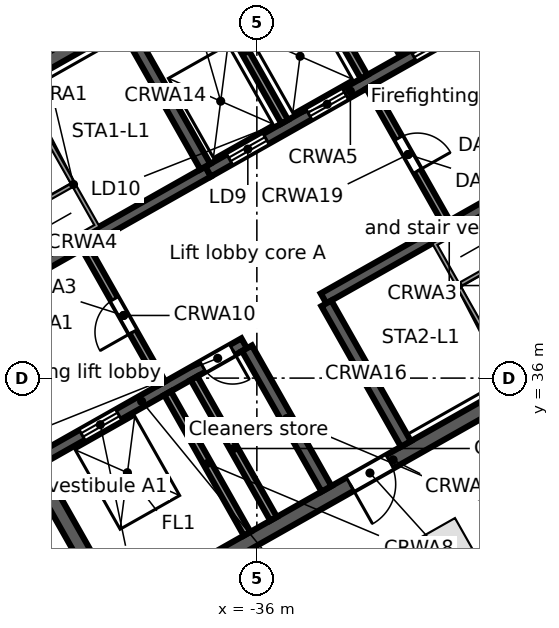
"""IFC4 building model, lengths in metres.
Left out: names, types, materials, properties, quantities, classifications, styles, units other than length and angle.
Written with IfcOpenShell. Run it as: python <this file> out.ifc"""

import sys

from ifc_helpers import new_model, si_unit, direction, frame, frame_2d, origin, origin_2d, place, context, subcontext, project, spatial, rectangle, extrude, element, fill, save


model = new_model("IFC4")
c1 = context("Model", 3, precision=1e-05, world=origin(), true_north=direction((0.0, 1.0)))
c2 = subcontext(c1, "Body", "Model", "MODEL_VIEW")
j1 = project(units=[si_unit("LENGTHUNIT", "METRE"), si_unit("PLANEANGLEUNIT", "RADIAN")], contexts=[c1])
p1 = place(None, origin())
s1 = spatial("IfcSite", under=j1, at=p1, CompositionType="ELEMENT")
p2 = place(p1, origin())
s2 = spatial("IfcBuilding", under=s1, at=p2, CompositionType="ELEMENT")
p3 = place(p2, frame((0.0, 0.0, 339.3)))
s3 = spatial("IfcBuildingStorey", under=s2, at=p3, CompositionType="ELEMENT", Elevation=339.3)
p4 = place(p3, frame((-30.976, 31.635, 0.0), z_axis=(0.0, 0.0, 1.0), x_axis=(0.87035569594, 0.492423560103, 0.0)))
e1 = element("IfcColumn", 1, at=p4, inside=s3, PredefinedType="COLUMN", context=c2, shape_type="SweptSolid", body=[
    extrude(rectangle(XDim=1.0, YDim=1.0, at=origin_2d()), origin(), (0.0, 0.0, 1.0), 3.8),
])
p5 = place(p3, frame((-3.017, 46.293, 0.0), z_axis=(0.0, 0.0, 1.0), x_axis=(-0.870355474887, -0.492423950812, 0.0)))
e2 = element("IfcWall", 2, at=p5, inside=s3, PredefinedType="STANDARD", context=c2, shape_type="SweptSolid", body=[
    extrude(rectangle(XDim=40.34, YDim=0.25, at=frame_2d((20.17, 0.0))), origin(), (0.0, 0.0, 1.0), 3.52),
])
p6 = place(p5, frame((37.428, 0.0, 0.8)))
e3 = element("IfcOpeningElement", 3, at=p6, cuts=e2, PredefinedType="OPENING", context=c2, shape_type="SweptSolid", body=[
    extrude(rectangle(XDim=2.4, YDim=2.2, at=frame_2d((1.2, 1.1))), frame((0.0, 0.135, 0.0), z_axis=(0.0, -1.0, 0.0), x_axis=(1.0, 0.0, 0.0)), (0.0, 0.0, 1.0), 0.27),
])
p7 = place(p5, frame((34.372, 0.0, 0.0)))
e4 = element("IfcOpeningElement", 4, at=p7, cuts=e2, PredefinedType="OPENING", context=c2, shape_type="SweptSolid", body=[
    extrude(rectangle(XDim=1.8, YDim=2.4, at=frame_2d((0.9, 1.2))), frame((0.0, 0.135, 0.0), z_axis=(0.0, -1.0, 0.0), x_axis=(1.0, 0.0, 0.0)), (0.0, 0.0, 1.0), 0.27),
])
p8 = place(p5, frame((30.716, 0.0, 0.8)))
e5 = element("IfcOpeningElement", 5, at=p8, cuts=e2, PredefinedType="OPENING", context=c2, shape_type="SweptSolid", body=[
    extrude(rectangle(XDim=2.4, YDim=2.2, at=frame_2d((1.2, 1.1))), frame((0.0, 0.135, 0.0), z_axis=(0.0, -1.0, 0.0), x_axis=(1.0, 0.0, 0.0)), (0.0, 0.0, 1.0), 0.27),
])
p9 = place(p5, frame((27.36, 0.0, 0.8)))
e6 = element("IfcOpeningElement", 6, at=p9, cuts=e2, PredefinedType="OPENING", context=c2, shape_type="SweptSolid", body=[
    extrude(rectangle(XDim=2.4, YDim=2.2, at=frame_2d((1.2, 1.1))), frame((0.0, 0.135, 0.0), z_axis=(0.0, -1.0, 0.0), x_axis=(1.0, 0.0, 0.0)), (0.0, 0.0, 1.0), 0.27),
])
p10 = place(p5, frame((24.304, 0.0, 0.0)))
e7 = element("IfcOpeningElement", 7, at=p10, cuts=e2, PredefinedType="OPENING", context=c2, shape_type="SweptSolid", body=[
    extrude(rectangle(XDim=1.8, YDim=2.4, at=frame_2d((0.9, 1.2))), frame((0.0, 0.135, 0.0), z_axis=(0.0, -1.0, 0.0), x_axis=(1.0, 0.0, 0.0)), (0.0, 0.0, 1.0), 0.27),
])
p11 = place(p5, frame((20.648, 0.0, 0.8)))
e8 = element("IfcOpeningElement", 8, at=p11, cuts=e2, PredefinedType="OPENING", context=c2, shape_type="SweptSolid", body=[
    extrude(rectangle(XDim=2.4, YDim=2.2, at=frame_2d((1.2, 1.1))), frame((0.0, 0.135, 0.0), z_axis=(0.0, -1.0, 0.0), x_axis=(1.0, 0.0, 0.0)), (0.0, 0.0, 1.0), 0.27),
])
p12 = place(p5, frame((17.292, 0.0, 0.8)))
e9 = element("IfcOpeningElement", 9, at=p12, cuts=e2, PredefinedType="OPENING", context=c2, shape_type="SweptSolid", body=[
    extrude(rectangle(XDim=2.4, YDim=2.2, at=frame_2d((1.2, 1.1))), frame((0.0, 0.135, 0.0), z_axis=(0.0, -1.0, 0.0), x_axis=(1.0, 0.0, 0.0)), (0.0, 0.0, 1.0), 0.27),
])
p13 = place(p5, frame((14.236, 0.0, 0.0)))
e10 = element("IfcOpeningElement", 10, at=p13, cuts=e2, PredefinedType="OPENING", context=c2, shape_type="SweptSolid", body=[
    extrude(rectangle(XDim=1.8, YDim=2.4, at=frame_2d((0.9, 1.2))), frame((0.0, 0.135, 0.0), z_axis=(0.0, -1.0, 0.0), x_axis=(1.0, 0.0, 0.0)), (0.0, 0.0, 1.0), 0.27),
])
p14 = place(p5, frame((10.58, 0.0, 0.8)))
e11 = element("IfcOpeningElement", 11, at=p14, cuts=e2, PredefinedType="OPENING", context=c2, shape_type="SweptSolid", body=[
    extrude(rectangle(XDim=2.4, YDim=2.2, at=frame_2d((1.2, 1.1))), frame((0.0, 0.135, 0.0), z_axis=(0.0, -1.0, 0.0), x_axis=(1.0, 0.0, 0.0)), (0.0, 0.0, 1.0), 0.27),
])
p15 = place(p5, frame((7.224, 0.0, 0.8)))
e12 = element("IfcOpeningElement", 12, at=p15, cuts=e2, PredefinedType="OPENING", context=c2, shape_type="SweptSolid", body=[
    extrude(rectangle(XDim=2.4, YDim=2.2, at=frame_2d((1.2, 1.1))), frame((0.0, 0.135, 0.0), z_axis=(0.0, -1.0, 0.0), x_axis=(1.0, 0.0, 0.0)), (0.0, 0.0, 1.0), 0.27),
])
p16 = place(p5, frame((4.168, 0.0, 0.0)))
e13 = element("IfcOpeningElement", 13, at=p16, cuts=e2, PredefinedType="OPENING", context=c2, shape_type="SweptSolid", body=[
    extrude(rectangle(XDim=1.8, YDim=2.4, at=frame_2d((0.9, 1.2))), frame((0.0, 0.135, 0.0), z_axis=(0.0, -1.0, 0.0), x_axis=(1.0, 0.0, 0.0)), (0.0, 0.0, 1.0), 0.27),
])
p17 = place(p5, frame((0.512, 0.0, 0.8)))
e14 = element("IfcOpeningElement", 14, at=p17, cuts=e2, PredefinedType="OPENING", context=c2, shape_type="SweptSolid", body=[
    extrude(rectangle(XDim=2.4, YDim=2.2, at=frame_2d((1.2, 1.1))), frame((0.0, 0.135, 0.0), z_axis=(0.0, -1.0, 0.0), x_axis=(1.0, 0.0, 0.0)), (0.0, 0.0, 1.0), 0.27),
])
p18 = place(p3, frame((-39.813, 29.662, 0.0), z_axis=(0.0, 0.0, 1.0), x_axis=(0.870350116061, 0.492433422375, 0.0)))
e15 = element("IfcWall", 15, at=p18, inside=s3, PredefinedType="SOLIDWALL", context=c2, shape_type="SweptSolid", body=[
    extrude(rectangle(XDim=17.0, YDim=0.4, at=frame_2d((8.5, 0.0))), origin(), (0.0, 0.0, 1.0), 3.52),
])
p19 = place(p18, frame((7.2, 0.0, 0.0)))
e16 = element("IfcOpeningElement", 16, at=p19, cuts=e15, PredefinedType="OPENING", context=c2, shape_type="SweptSolid", body=[
    extrude(rectangle(XDim=1.2, YDim=2.1, at=frame_2d((0.6, 1.05))), frame((0.0, 0.21, 0.0), z_axis=(0.0, -1.0, 0.0), x_axis=(1.0, 0.0, 0.0)), (0.0, 0.0, 1.0), 0.42),
])
p20 = place(p3, frame((-41.73, 33.863, 0.0), z_axis=(0.0, 0.0, 1.0), x_axis=(0.870350800578, 0.492432212525, 0.0)))
e17 = element("IfcWall", 17, at=p20, inside=s3, PredefinedType="SOLIDWALL", context=c2, shape_type="SweptSolid", body=[
    extrude(rectangle(XDim=6.2, YDim=0.3, at=frame_2d((3.1, 0.0))), origin(), (0.0, 0.0, 1.0), 3.52),
])
p21 = place(p20, frame((1.3, 0.0, 0.0)))
e18 = element("IfcOpeningElement", 18, at=p21, cuts=e17, PredefinedType="OPENING", context=c2, shape_type="SweptSolid", body=[
    extrude(rectangle(XDim=1.1, YDim=2.1, at=frame_2d((0.55, 1.05))), frame((0.0, 0.16, 0.0), z_axis=(0.0, -1.0, 0.0), x_axis=(1.0, 0.0, 0.0)), (0.0, 0.0, 1.0), 0.32),
])
p22 = place(p20, frame((4.95, 0.0, 0.0)))
e19 = element("IfcOpeningElement", 19, at=p22, cuts=e17, PredefinedType="OPENING", context=c2, shape_type="SweptSolid", body=[
    extrude(rectangle(XDim=0.9, YDim=2.1, at=frame_2d((0.45, 1.05))), frame((0.0, 0.16, 0.0), z_axis=(0.0, -1.0, 0.0), x_axis=(1.0, 0.0, 0.0)), (0.0, 0.0, 1.0), 0.32),
])
p23 = place(p3, frame((-34.245, 38.097, 0.0), z_axis=(0.0, 0.0, 1.0), x_axis=(0.870356351998, 0.492422400523, 0.0)))
e20 = element("IfcWall", 20, at=p23, inside=s3, PredefinedType="SOLIDWALL", context=c2, shape_type="SweptSolid", body=[
    extrude(rectangle(XDim=7.6, YDim=0.3, at=frame_2d((3.8, 0.0))), origin(), (0.0, 0.0, 1.0), 3.52),
])
p24 = place(p23, frame((6.2, 0.0, 0.0)))
e21 = element("IfcOpeningElement", 21, at=p24, cuts=e20, PredefinedType="OPENING", context=c2, shape_type="SweptSolid", body=[
    extrude(rectangle(XDim=1.0, YDim=2.1, at=frame_2d((0.5, 1.05))), frame((0.0, 0.16, 0.0), z_axis=(0.0, -1.0, 0.0), x_axis=(1.0, 0.0, 0.0)), (0.0, 0.0, 1.0), 0.32),
])
p25 = place(p3, frame((-43.897, 37.692, 0.0), z_axis=(0.0, 0.0, 1.0), x_axis=(0.870356351998, 0.492422400523, 0.0)))
e22 = element("IfcWall", 22, at=p25, inside=s3, PredefinedType="SOLIDWALL", context=c2, shape_type="SweptSolid", body=[
    extrude(rectangle(XDim=7.6, YDim=0.3, at=frame_2d((3.8, 0.0))), origin(), (0.0, 0.0, 1.0), 3.52),
])
p26 = place(p25, frame((0.4, 0.0, 0.0)))
e23 = element("IfcOpeningElement", 23, at=p26, cuts=e22, PredefinedType="OPENING", context=c2, shape_type="SweptSolid", body=[
    extrude(rectangle(XDim=1.0, YDim=2.1, at=frame_2d((0.5, 1.05))), frame((0.0, 0.16, 0.0), z_axis=(0.0, -1.0, 0.0), x_axis=(1.0, 0.0, 0.0)), (0.0, 0.0, 1.0), 0.32),
])
p27 = place(p3, frame((-37.282, 41.435, 0.0), z_axis=(0.0, 0.0, 1.0), x_axis=(0.870361315115, 0.492413628113, 0.0)))
e24 = element("IfcWall", 24, at=p27, inside=s3, PredefinedType="SOLIDWALL", context=c2, shape_type="SweptSolid", body=[
    extrude(rectangle(XDim=8.6, YDim=0.3, at=frame_2d((4.3, 0.0))), origin(), (0.0, 0.0, 1.0), 3.52),
])
p28 = place(p27, frame((0.65, 0.0, 0.0)))
e25 = element("IfcOpeningElement", 25, at=p28, cuts=e24, PredefinedType="OPENING", context=c2, shape_type="SweptSolid", body=[
    extrude(rectangle(XDim=1.1, YDim=2.1, at=frame_2d((0.55, 1.05))), frame((0.0, 0.16, 0.0), z_axis=(0.0, -1.0, 0.0), x_axis=(1.0, 0.0, 0.0)), (0.0, 0.0, 1.0), 0.32),
])
p29 = place(p27, frame((3.05, 0.0, 0.0)))
e26 = element("IfcOpeningElement", 26, at=p29, cuts=e24, PredefinedType="OPENING", context=c2, shape_type="SweptSolid", body=[
    extrude(rectangle(XDim=1.1, YDim=2.1, at=frame_2d((0.55, 1.05))), frame((0.0, 0.16, 0.0), z_axis=(0.0, -1.0, 0.0), x_axis=(1.0, 0.0, 0.0)), (0.0, 0.0, 1.0), 0.32),
])
p30 = place(p27, frame((6.2, 0.0, 0.0)))
e27 = element("IfcOpeningElement", 27, at=p30, cuts=e24, PredefinedType="OPENING", context=c2, shape_type="SweptSolid", body=[
    extrude(rectangle(XDim=1.1, YDim=2.1, at=frame_2d((0.55, 1.05))), frame((0.0, 0.16, 0.0), z_axis=(0.0, -1.0, 0.0), x_axis=(1.0, 0.0, 0.0)), (0.0, 0.0, 1.0), 0.32),
])
p31 = place(p3, frame((-46.51, 41.499, 0.0), z_axis=(0.0, 0.0, 1.0), x_axis=(0.870356271124, 0.492422543467, 0.0)))
e28 = element("IfcWall", 28, at=p31, inside=s3, PredefinedType="SOLIDWALL", context=c2, shape_type="SweptSolid", body=[
    extrude(rectangle(XDim=17.0, YDim=0.4, at=frame_2d((8.5, 0.0))), origin(), (0.0, 0.0, 1.0), 3.52),
])
p32 = place(p3, frame((-46.238, 41.423, 0.0), z_axis=(0.0, 0.0, 1.0), x_axis=(0.492421663121, -0.870356769198, 0.0)))
e29 = element("IfcWall", 29, at=p32, inside=s3, PredefinedType="SOLIDWALL", context=c2, shape_type="SweptSolid", body=[
    extrude(rectangle(XDim=13.2, YDim=0.4, at=frame_2d((6.6, 0.0))), origin(), (0.0, 0.0, 1.0), 3.52),
])
p33 = place(p3, frame((-38.349, 35.603, 0.0), z_axis=(0.0, 0.0, 1.0), x_axis=(0.492397924348, -0.870370199454, 0.0)))
e30 = element("IfcWall", 30, at=p33, inside=s3, PredefinedType="SOLIDWALL", context=c2, shape_type="SweptSolid", body=[
    extrude(rectangle(XDim=4.25, YDim=0.2, at=frame_2d((2.125, 0.0))), origin(), (0.0, 0.0, 1.0), 3.52),
])
p34 = place(p3, frame((-40.516, 39.433, 0.0), z_axis=(0.0, 0.0, 1.0), x_axis=(0.492453559952, -0.87033872216, 0.0)))
e31 = element("IfcWall", 31, at=p34, inside=s3, PredefinedType="PARTITIONING", context=c2, shape_type="SweptSolid", body=[
    extrude(rectangle(XDim=4.1, YDim=0.2, at=frame_2d((2.05, 0.0))), origin(), (0.0, 0.0, 1.0), 3.52),
])
p35 = place(p34, frame((1.55, 0.0, 0.0)))
e32 = element("IfcOpeningElement", 32, at=p35, cuts=e31, PredefinedType="OPENING", context=c2, shape_type="SweptSolid", body=[
    extrude(rectangle(XDim=1.0, YDim=2.1, at=frame_2d((0.5, 1.05))), frame((0.0, 0.11, 0.0), z_axis=(0.0, -1.0, 0.0), x_axis=(1.0, 0.0, 0.0)), (0.0, 0.0, 1.0), 0.22),
])
p36 = place(p3, frame((-37.653, 35.997, 0.0), z_axis=(0.0, 0.0, 1.0), x_axis=(0.492422543467, -0.870356271124, 0.0)))
e33 = element("IfcWall", 33, at=p36, inside=s3, PredefinedType="SOLIDWALL", context=c2, shape_type="SweptSolid", body=[
    extrude(rectangle(XDim=4.25, YDim=0.2, at=frame_2d((2.125, 0.0))), origin(), (0.0, 0.0, 1.0), 3.52),
])
for number, where, z_axis, x_axis in (
    (34, (-36.26, 36.785, 0.0), (0.0, 0.0, 1.0), (0.492, -0.87, 0.0)),
    (35, (-39.449, 45.264, 0.0), (0.0, 0.0, 1.0), (0.492, -0.87, 0.0)),
    (36, (-34.171, 37.967, 0.0), (0.0, 0.0, 1.0), (0.492, -0.87, 0.0)),
):
    element("IfcWall", number, at=place(p3, frame(where, z_axis=z_axis, x_axis=x_axis)), inside=s3, PredefinedType="SOLIDWALL", context=c2, shape_type="SweptSolid", body=[
        extrude(rectangle(XDim=4.25, YDim=0.3, at=frame_2d((2.125, 0.0))), origin(), (0.0, 0.0, 1.0), 3.52),
    ])
p37 = place(p3, frame((-37.36, 46.446, 0.0), z_axis=(0.0, 0.0, 1.0), x_axis=(0.492422543467, -0.870356271124, 0.0)))
e37 = element("IfcWall", 37, at=p37, inside=s3, PredefinedType="SOLIDWALL", context=c2, shape_type="SweptSolid", body=[
    extrude(rectangle(XDim=4.25, YDim=0.2, at=frame_2d((2.125, 0.0))), origin(), (0.0, 0.0, 1.0), 3.52),
])
p38 = place(p3, frame((-33.031, 43.667, 0.0), z_axis=(0.0, 0.0, 1.0), x_axis=(0.492408451753, -0.87036424366, 0.0)))
e38 = element("IfcWall", 38, at=p38, inside=s3, PredefinedType="PARTITIONING", context=c2, shape_type="SweptSolid", body=[
    extrude(rectangle(XDim=4.1, YDim=0.2, at=frame_2d((2.05, 0.0))), origin(), (0.0, 0.0, 1.0), 3.52),
])
p39 = place(p38, frame((1.55, 0.0, 0.0)))
e39 = element("IfcOpeningElement", 39, at=p39, cuts=e38, PredefinedType="OPENING", context=c2, shape_type="SweptSolid", body=[
    extrude(rectangle(XDim=1.0, YDim=2.1, at=frame_2d((0.5, 1.05))), frame((0.0, 0.11, 0.0), z_axis=(0.0, -1.0, 0.0), x_axis=(1.0, 0.0, 0.0)), (0.0, 0.0, 1.0), 0.22),
])
p40 = place(p3, frame((-35.271, 47.628, 0.0), z_axis=(0.0, 0.0, 1.0), x_axis=(0.492422543467, -0.870356271124, 0.0)))
e40 = element("IfcWall", 40, at=p40, inside=s3, PredefinedType="SOLIDWALL", context=c2, shape_type="SweptSolid", body=[
    extrude(rectangle(XDim=4.25, YDim=0.2, at=frame_2d((2.125, 0.0))), origin(), (0.0, 0.0, 1.0), 3.52),
])
p41 = place(p3, frame((-31.79, 49.597, 0.0), z_axis=(0.0, 0.0, 1.0), x_axis=(0.492421663121, -0.870356769198, 0.0)))
e41 = element("IfcWall", 41, at=p41, inside=s3, PredefinedType="SOLIDWALL", context=c2, shape_type="SweptSolid", body=[
    extrude(rectangle(XDim=13.2, YDim=0.4, at=frame_2d((6.6, 0.0))), origin(), (0.0, 0.0, 1.0), 3.52),
])
p42 = place(p3, frame((-43.917, 32.855, 0.0), z_axis=(0.0, 0.0, 1.0), x_axis=(0.492446757002, -0.870342571358, 0.0)))
e42 = element("IfcWall", 42, at=p42, inside=s3, PredefinedType="PARTITIONING", context=c2, shape_type="SweptSolid", body=[
    extrude(rectangle(XDim=7.187, YDim=0.125, at=frame_2d((3.593, 0.0))), origin(), (0.0, 0.0, 1.0), 2.8),
])
p43 = place(p42, frame((3.2, 0.0, 0.0)))
e43 = element("IfcOpeningElement", 43, at=p43, cuts=e42, PredefinedType="OPENING", context=c2, shape_type="SweptSolid", body=[
    extrude(rectangle(XDim=0.9, YDim=2.1, at=frame_2d((0.45, 1.05))), frame((0.0, 0.073, 0.0), z_axis=(0.0, -1.0, 0.0), x_axis=(1.0, 0.0, 0.0)), (0.0, 0.0, 1.0), 0.145),
])
p44 = place(p28, origin())
e44 = element("IfcDoor", 44, at=p44, inside=s3, OperationType="DOUBLE_DOOR_SLIDING", PredefinedType="DOOR", context=c2, shape_type="SweptSolid", body=[
    extrude(rectangle(XDim=1.1, YDim=2.1, at=frame_2d((0.55, 1.05))), frame((0.0, 0.025, 0.0), z_axis=(0.0, -1.0, 0.0), x_axis=(1.0, 0.0, 0.0)), (0.0, 0.0, 1.0), 0.05),
])
fill(e25, e44)
p45 = place(p29, origin())
e45 = element("IfcDoor", 45, at=p45, inside=s3, OperationType="DOUBLE_DOOR_SLIDING", PredefinedType="DOOR", context=c2, shape_type="SweptSolid", body=[
    extrude(rectangle(XDim=1.1, YDim=2.1, at=frame_2d((0.55, 1.05))), frame((0.0, 0.025, 0.0), z_axis=(0.0, -1.0, 0.0), x_axis=(1.0, 0.0, 0.0)), (0.0, 0.0, 1.0), 0.05),
])
fill(e26, e45)
p46 = place(p30, origin())
e46 = element("IfcDoor", 46, at=p46, inside=s3, OperationType="DOUBLE_DOOR_SLIDING", PredefinedType="DOOR", context=c2, shape_type="SweptSolid", body=[
    extrude(rectangle(XDim=1.1, YDim=2.1, at=frame_2d((0.55, 1.05))), frame((0.0, 0.025, 0.0), z_axis=(0.0, -1.0, 0.0), x_axis=(1.0, 0.0, 0.0)), (0.0, 0.0, 1.0), 0.05),
])
fill(e27, e46)
p47 = place(p21, origin())
e47 = element("IfcDoor", 47, at=p47, inside=s3, OperationType="DOUBLE_DOOR_SLIDING", PredefinedType="DOOR", context=c2, shape_type="SweptSolid", body=[
    extrude(rectangle(XDim=1.1, YDim=2.1, at=frame_2d((0.55, 1.05))), frame((0.0, 0.025, 0.0), z_axis=(0.0, -1.0, 0.0), x_axis=(1.0, 0.0, 0.0)), (0.0, 0.0, 1.0), 0.05),
])
fill(e18, e47)
p48 = place(p35, frame((1.0, 0.0, 0.0), z_axis=(0.0, 0.0, 1.0), x_axis=(-1.0, 0.0, 0.0)))
e48 = element("IfcDoor", 48, at=p48, inside=s3, OperationType="SINGLE_SWING_LEFT", PredefinedType="DOOR", context=c2, shape_type="SweptSolid", body=[
    extrude(rectangle(XDim=1.0, YDim=2.1, at=frame_2d((0.5, 1.05))), frame((0.0, 0.025, 0.0), z_axis=(0.0, -1.0, 0.0), x_axis=(1.0, 0.0, 0.0)), (0.0, 0.0, 1.0), 0.05),
])
fill(e32, e48)
p49 = place(p39, origin())
e49 = element("IfcDoor", 49, at=p49, inside=s3, OperationType="SINGLE_SWING_RIGHT", PredefinedType="DOOR", context=c2, shape_type="SweptSolid", body=[
    extrude(rectangle(XDim=1.0, YDim=2.1, at=frame_2d((0.5, 1.05))), frame((0.0, 0.025, 0.0), z_axis=(0.0, -1.0, 0.0), x_axis=(1.0, 0.0, 0.0)), (0.0, 0.0, 1.0), 0.05),
])
fill(e39, e49)
p50 = place(p19, frame((1.2, 0.0, 0.0), z_axis=(0.0, 0.0, 1.0), x_axis=(-1.0, 0.0, 0.0)))
e50 = element("IfcDoor", 50, at=p50, inside=s3, OperationType="SINGLE_SWING_RIGHT", PredefinedType="DOOR", context=c2, shape_type="SweptSolid", body=[
    extrude(rectangle(XDim=1.2, YDim=2.1, at=frame_2d((0.6, 1.05))), frame((0.0, 0.025, 0.0), z_axis=(0.0, -1.0, 0.0), x_axis=(1.0, 0.0, 0.0)), (0.0, 0.0, 1.0), 0.05),
])
fill(e16, e50)
p51 = place(p22, frame((0.9, 0.0, 0.0), z_axis=(0.0, 0.0, 1.0), x_axis=(-1.0, 0.0, 0.0)))
e51 = element("IfcDoor", 51, at=p51, inside=s3, OperationType="SINGLE_SWING_LEFT", PredefinedType="DOOR", context=c2, shape_type="SweptSolid", body=[
    extrude(rectangle(XDim=0.9, YDim=2.1, at=frame_2d((0.45, 1.05))), frame((0.0, 0.025, 0.0), z_axis=(0.0, -1.0, 0.0), x_axis=(1.0, 0.0, 0.0)), (0.0, 0.0, 1.0), 0.05),
])
fill(e19, e51)
save(model, sys.argv[1])
